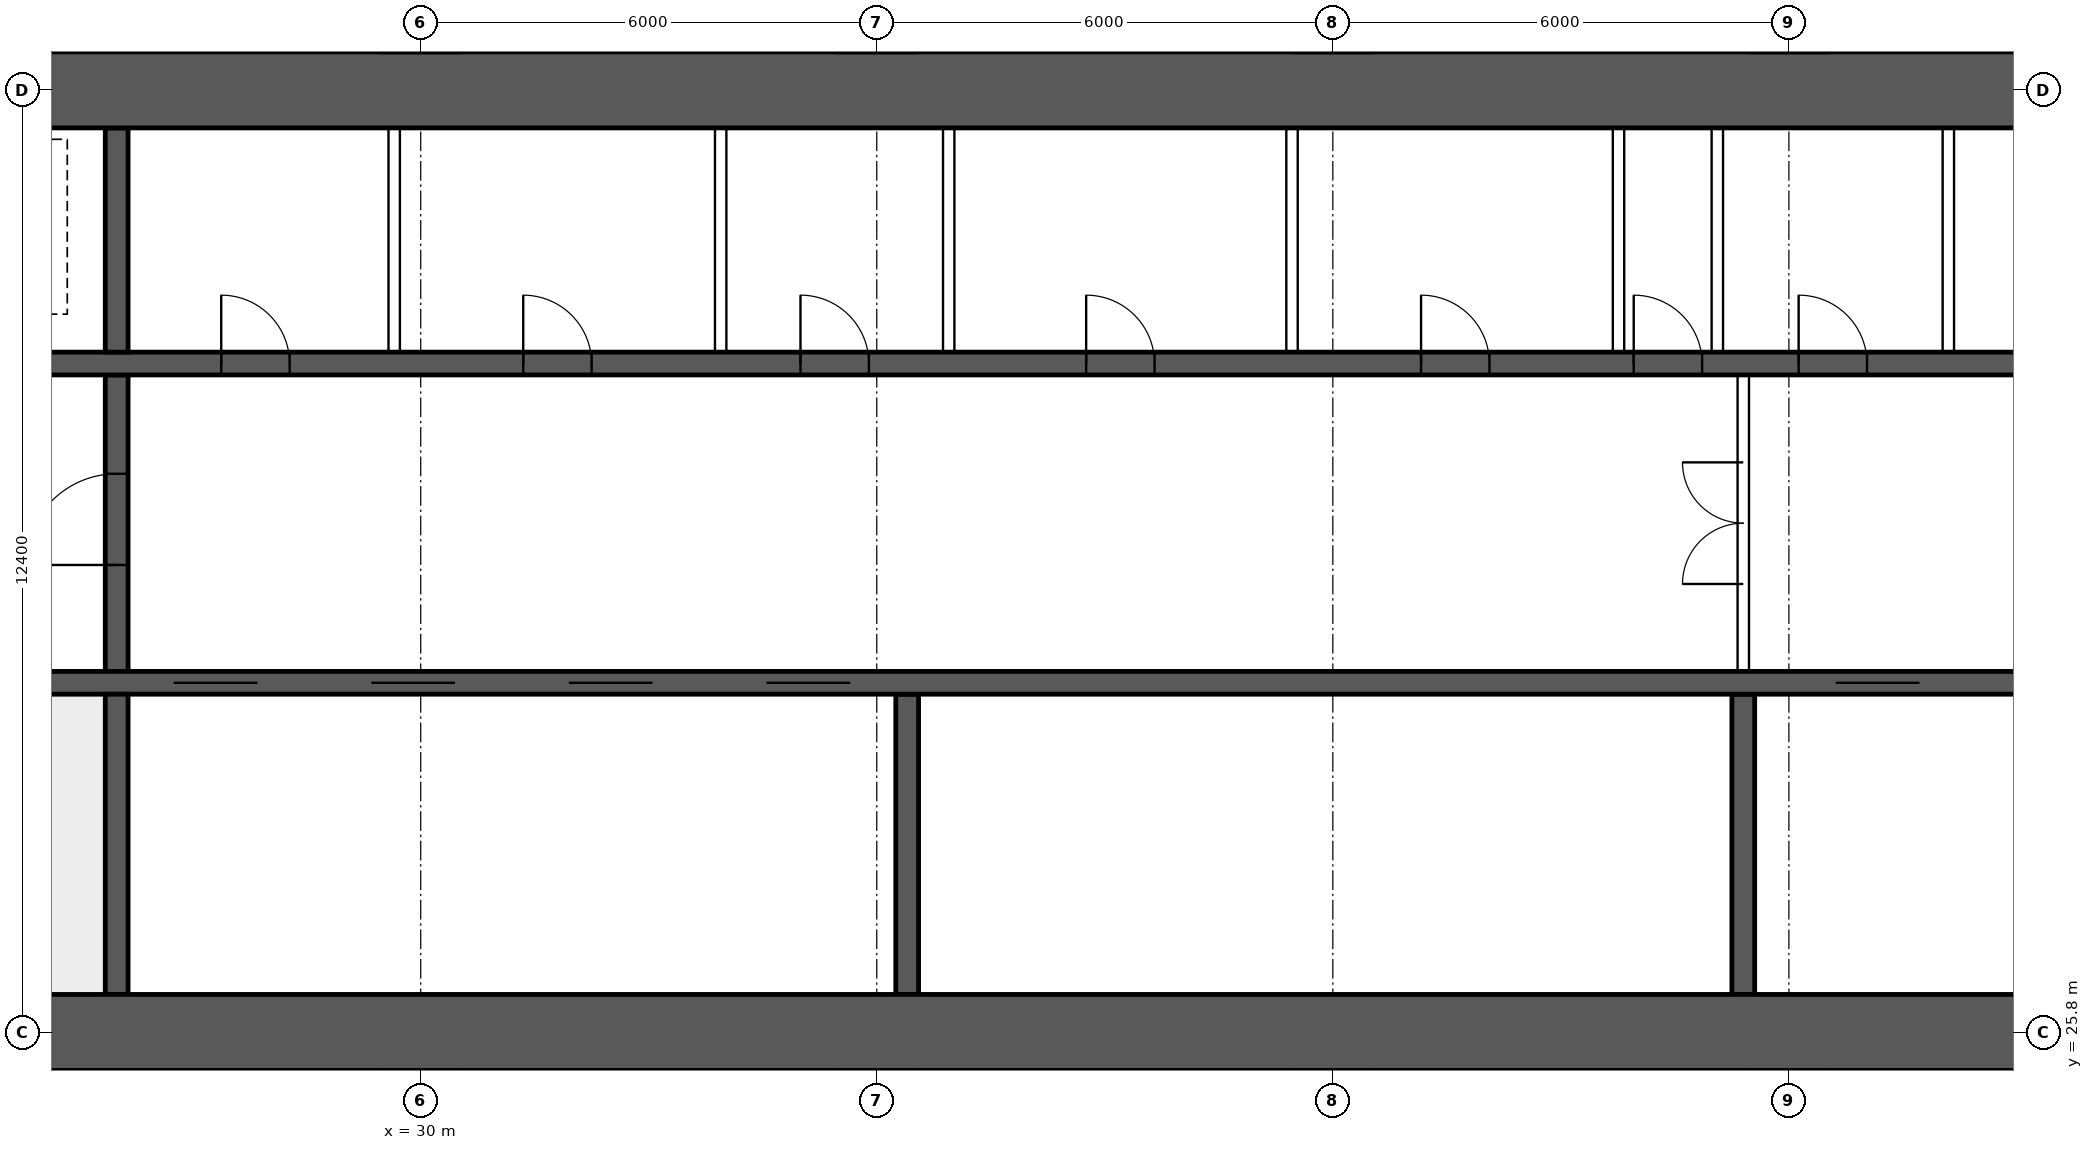
"""IFC4 building model, lengths in metres.
Left out: names, types, materials, properties, quantities, classifications, styles, units other than length and angle.
Written with IfcOpenShell. Run it as: python <this file> out.ifc"""

import sys

from ifc_helpers import new_model, si_unit, direction, frame, frame_2d, origin, place, context, subcontext, project, spatial, rectangle, extrude, element, fill, save


model = new_model("IFC4")
c1 = context("Model", 3, precision=1e-05, world=origin(), true_north=direction((0.0, 1.0)))
c2 = subcontext(c1, "Body", "Model", "MODEL_VIEW")
j1 = project(units=[si_unit("LENGTHUNIT", "METRE"), si_unit("PLANEANGLEUNIT", "RADIAN")], contexts=[c1])
p1 = place(None, origin())
s1 = spatial("IfcSite", under=j1, at=p1, CompositionType="ELEMENT")
p2 = place(p1, origin())
s2 = spatial("IfcBuilding", under=s1, at=p2, CompositionType="ELEMENT")
p3 = place(p2, frame((0.0, 0.0, 53.95)))
s3 = spatial("IfcBuildingStorey", under=s2, at=p3, CompositionType="ELEMENT", Elevation=53.95)
for number, where, z_axis, x_axis in (
    (1, (18.0, 25.8, 0.0), (0.0, 0.0, 1.0), (1.0, 0.0, 0.0)),
    (2, (18.0, 38.2, 0.0), (0.0, 0.0, 1.0), (1.0, 0.0, 0.0)),
):
    element("IfcWall", number, at=place(p3, frame(where, z_axis=z_axis, x_axis=x_axis)), inside=s3, PredefinedType="SHEAR", context=c2, shape_type="SweptSolid", body=[
        extrude(rectangle(XDim=48.0, YDim=1.0, at=frame_2d((24.0, 0.0))), origin(), (0.0, 0.0, 1.0), 3.75),
    ])
p4 = place(p3, frame((18.5, 30.4, 0.0), z_axis=(0.0, 0.0, 1.0), x_axis=(1.0, 0.0, 0.0)))
e3 = element("IfcWall", 3, at=p4, inside=s3, PredefinedType="SHEAR", context=c2, shape_type="SweptSolid", body=[
    extrude(rectangle(XDim=47.0, YDim=0.3, at=frame_2d((23.5, 0.0))), origin(), (0.0, 0.0, 1.0), 3.75),
])
p5 = place(p4, frame((0.4, 0.0, 0.0)))
e4 = element("IfcOpeningElement", 4, at=p5, cuts=e3, PredefinedType="OPENING", context=c2, shape_type="SweptSolid", body=[
    extrude(rectangle(XDim=1.0, YDim=2.1, at=frame_2d((0.5, 1.05))), frame((0.0, 0.16, 0.0), z_axis=(0.0, -1.0, 0.0), x_axis=(1.0, 0.0, 0.0)), (0.0, 0.0, 1.0), 0.32),
])
p6 = place(p4, frame((45.6, 0.0, 0.0)))
e5 = element("IfcOpeningElement", 5, at=p6, cuts=e3, PredefinedType="OPENING", context=c2, shape_type="SweptSolid", body=[
    extrude(rectangle(XDim=1.0, YDim=2.1, at=frame_2d((0.5, 1.05))), frame((0.0, 0.16, 0.0), z_axis=(0.0, -1.0, 0.0), x_axis=(1.0, 0.0, 0.0)), (0.0, 0.0, 1.0), 0.32),
])
p7 = place(p4, frame((8.25, 0.0, 0.0)))
e6 = element("IfcOpeningElement", 6, at=p7, cuts=e3, PredefinedType="OPENING", context=c2, shape_type="SweptSolid", body=[
    extrude(rectangle(XDim=1.1, YDim=2.1, at=frame_2d((0.55, 1.05))), frame((0.0, 0.16, 0.0), z_axis=(0.0, -1.0, 0.0), x_axis=(1.0, 0.0, 0.0)), (0.0, 0.0, 1.0), 0.32),
])
p8 = place(p4, frame((10.85, 0.0, 0.0)))
e7 = element("IfcOpeningElement", 7, at=p8, cuts=e3, PredefinedType="OPENING", context=c2, shape_type="SweptSolid", body=[
    extrude(rectangle(XDim=1.1, YDim=2.1, at=frame_2d((0.55, 1.05))), frame((0.0, 0.16, 0.0), z_axis=(0.0, -1.0, 0.0), x_axis=(1.0, 0.0, 0.0)), (0.0, 0.0, 1.0), 0.32),
])
p9 = place(p4, frame((13.45, 0.0, 0.0)))
e8 = element("IfcOpeningElement", 8, at=p9, cuts=e3, PredefinedType="OPENING", context=c2, shape_type="SweptSolid", body=[
    extrude(rectangle(XDim=1.1, YDim=2.1, at=frame_2d((0.55, 1.05))), frame((0.0, 0.16, 0.0), z_axis=(0.0, -1.0, 0.0), x_axis=(1.0, 0.0, 0.0)), (0.0, 0.0, 1.0), 0.32),
])
p10 = place(p4, frame((16.05, 0.0, 0.0)))
e9 = element("IfcOpeningElement", 9, at=p10, cuts=e3, PredefinedType="OPENING", context=c2, shape_type="SweptSolid", body=[
    extrude(rectangle(XDim=1.1, YDim=2.1, at=frame_2d((0.55, 1.05))), frame((0.0, 0.16, 0.0), z_axis=(0.0, -1.0, 0.0), x_axis=(1.0, 0.0, 0.0)), (0.0, 0.0, 1.0), 0.32),
])
p11 = place(p4, frame((30.117, 0.0, 0.0)))
e10 = element("IfcOpeningElement", 10, at=p11, cuts=e3, PredefinedType="OPENING", context=c2, shape_type="SweptSolid", body=[
    extrude(rectangle(XDim=1.1, YDim=2.1, at=frame_2d((0.55, 1.05))), frame((0.0, 0.16, 0.0), z_axis=(0.0, -1.0, 0.0), x_axis=(1.0, 0.0, 0.0)), (0.0, 0.0, 1.0), 0.32),
])
p12 = place(p4, frame((33.65, 0.0, 0.0)))
e11 = element("IfcOpeningElement", 11, at=p12, cuts=e3, PredefinedType="OPENING", context=c2, shape_type="SweptSolid", body=[
    extrude(rectangle(XDim=1.1, YDim=2.1, at=frame_2d((0.55, 1.05))), frame((0.0, 0.16, 0.0), z_axis=(0.0, -1.0, 0.0), x_axis=(1.0, 0.0, 0.0)), (0.0, 0.0, 1.0), 0.32),
])
p13 = place(p4, frame((37.183, 0.0, 0.0)))
e12 = element("IfcOpeningElement", 12, at=p13, cuts=e3, PredefinedType="OPENING", context=c2, shape_type="SweptSolid", body=[
    extrude(rectangle(XDim=1.1, YDim=2.1, at=frame_2d((0.55, 1.05))), frame((0.0, 0.16, 0.0), z_axis=(0.0, -1.0, 0.0), x_axis=(1.0, 0.0, 0.0)), (0.0, 0.0, 1.0), 0.32),
])
p14 = place(p3, frame((18.5, 34.6, 0.0), z_axis=(0.0, 0.0, 1.0), x_axis=(1.0, 0.0, 0.0)))
e13 = element("IfcWall", 13, at=p14, inside=s3, PredefinedType="SHEAR", context=c2, shape_type="SweptSolid", body=[
    extrude(rectangle(XDim=47.0, YDim=0.3, at=frame_2d((23.5, 0.0))), origin(), (0.0, 0.0, 1.0), 3.75),
])
p15 = place(p14, frame((0.9, 0.0, 0.0)))
e14 = element("IfcOpeningElement", 14, at=p15, cuts=e13, PredefinedType="OPENING", context=c2, shape_type="SweptSolid", body=[
    extrude(rectangle(XDim=1.1, YDim=2.1, at=frame_2d((0.55, 1.05))), frame((0.0, 0.16, 0.0), z_axis=(0.0, -1.0, 0.0), x_axis=(1.0, 0.0, 0.0)), (0.0, 0.0, 1.0), 0.32),
])
p16 = place(p14, frame((45.0, 0.0, 0.0)))
e15 = element("IfcOpeningElement", 15, at=p16, cuts=e13, PredefinedType="OPENING", context=c2, shape_type="SweptSolid", body=[
    extrude(rectangle(XDim=1.1, YDim=2.1, at=frame_2d((0.55, 1.05))), frame((0.0, 0.16, 0.0), z_axis=(0.0, -1.0, 0.0), x_axis=(1.0, 0.0, 0.0)), (0.0, 0.0, 1.0), 0.32),
])
p17 = place(p14, frame((4.1, 0.0, 0.0)))
e16 = element("IfcOpeningElement", 16, at=p17, cuts=e13, PredefinedType="OPENING", context=c2, shape_type="SweptSolid", body=[
    extrude(rectangle(XDim=0.9, YDim=2.1, at=frame_2d((0.45, 1.05))), frame((0.0, 0.16, 0.0), z_axis=(0.0, -1.0, 0.0), x_axis=(1.0, 0.0, 0.0)), (0.0, 0.0, 1.0), 0.32),
])
p18 = place(p14, frame((42.0, 0.0, 0.0)))
e17 = element("IfcOpeningElement", 17, at=p18, cuts=e13, PredefinedType="OPENING", context=c2, shape_type="SweptSolid", body=[
    extrude(rectangle(XDim=0.9, YDim=2.1, at=frame_2d((0.45, 1.05))), frame((0.0, 0.16, 0.0), z_axis=(0.0, -1.0, 0.0), x_axis=(1.0, 0.0, 0.0)), (0.0, 0.0, 1.0), 0.32),
])
p19 = place(p14, frame((8.875, 0.0, 0.0)))
e18 = element("IfcOpeningElement", 18, at=p19, cuts=e13, PredefinedType="OPENING", context=c2, shape_type="SweptSolid", body=[
    extrude(rectangle(XDim=0.9, YDim=2.1, at=frame_2d((0.45, 1.05))), frame((0.0, 0.16, 0.0), z_axis=(0.0, -1.0, 0.0), x_axis=(1.0, 0.0, 0.0)), (0.0, 0.0, 1.0), 0.32),
])
p20 = place(p14, frame((12.849, 0.0, 0.0)))
e19 = element("IfcOpeningElement", 19, at=p20, cuts=e13, PredefinedType="OPENING", context=c2, shape_type="SweptSolid", body=[
    extrude(rectangle(XDim=0.9, YDim=2.1, at=frame_2d((0.45, 1.05))), frame((0.0, 0.16, 0.0), z_axis=(0.0, -1.0, 0.0), x_axis=(1.0, 0.0, 0.0)), (0.0, 0.0, 1.0), 0.32),
])
p21 = place(p14, frame((16.496, 0.0, 0.0)))
e20 = element("IfcOpeningElement", 20, at=p21, cuts=e13, PredefinedType="OPENING", context=c2, shape_type="SweptSolid", body=[
    extrude(rectangle(XDim=0.9, YDim=2.1, at=frame_2d((0.45, 1.05))), frame((0.0, 0.16, 0.0), z_axis=(0.0, -1.0, 0.0), x_axis=(1.0, 0.0, 0.0)), (0.0, 0.0, 1.0), 0.32),
])
p22 = place(p14, frame((20.255, 0.0, 0.0)))
e21 = element("IfcOpeningElement", 21, at=p22, cuts=e13, PredefinedType="OPENING", context=c2, shape_type="SweptSolid", body=[
    extrude(rectangle(XDim=0.9, YDim=2.1, at=frame_2d((0.45, 1.05))), frame((0.0, 0.16, 0.0), z_axis=(0.0, -1.0, 0.0), x_axis=(1.0, 0.0, 0.0)), (0.0, 0.0, 1.0), 0.32),
])
p23 = place(p14, frame((24.661, 0.0, 0.0)))
e22 = element("IfcOpeningElement", 22, at=p23, cuts=e13, PredefinedType="OPENING", context=c2, shape_type="SweptSolid", body=[
    extrude(rectangle(XDim=0.9, YDim=2.1, at=frame_2d((0.45, 1.05))), frame((0.0, 0.16, 0.0), z_axis=(0.0, -1.0, 0.0), x_axis=(1.0, 0.0, 0.0)), (0.0, 0.0, 1.0), 0.32),
])
p24 = place(p14, frame((27.458, 0.0, 0.0)))
e23 = element("IfcOpeningElement", 23, at=p24, cuts=e13, PredefinedType="OPENING", context=c2, shape_type="SweptSolid", body=[
    extrude(rectangle(XDim=0.9, YDim=2.1, at=frame_2d((0.45, 1.05))), frame((0.0, 0.16, 0.0), z_axis=(0.0, -1.0, 0.0), x_axis=(1.0, 0.0, 0.0)), (0.0, 0.0, 1.0), 0.32),
])
p25 = place(p14, frame((29.628, 0.0, 0.0)))
e24 = element("IfcOpeningElement", 24, at=p25, cuts=e13, PredefinedType="OPENING", context=c2, shape_type="SweptSolid", body=[
    extrude(rectangle(XDim=0.9, YDim=2.1, at=frame_2d((0.45, 1.05))), frame((0.0, 0.16, 0.0), z_axis=(0.0, -1.0, 0.0), x_axis=(1.0, 0.0, 0.0)), (0.0, 0.0, 1.0), 0.32),
])
p26 = place(p14, frame((33.427, 0.0, 0.0)))
e25 = element("IfcOpeningElement", 25, at=p26, cuts=e13, PredefinedType="OPENING", context=c2, shape_type="SweptSolid", body=[
    extrude(rectangle(XDim=0.9, YDim=2.1, at=frame_2d((0.45, 1.05))), frame((0.0, 0.16, 0.0), z_axis=(0.0, -1.0, 0.0), x_axis=(1.0, 0.0, 0.0)), (0.0, 0.0, 1.0), 0.32),
])
p27 = place(p14, frame((37.378, 0.0, 0.0)))
e26 = element("IfcOpeningElement", 26, at=p27, cuts=e13, PredefinedType="OPENING", context=c2, shape_type="SweptSolid", body=[
    extrude(rectangle(XDim=0.9, YDim=2.1, at=frame_2d((0.45, 1.05))), frame((0.0, 0.16, 0.0), z_axis=(0.0, -1.0, 0.0), x_axis=(1.0, 0.0, 0.0)), (0.0, 0.0, 1.0), 0.32),
])
p28 = place(p3, frame((26.0, 26.3, 0.0), z_axis=(0.0, 0.0, 1.0), x_axis=(0.0, 1.0, 0.0)))
e27 = element("IfcWall", 27, at=p28, inside=s3, PredefinedType="SHEAR", context=c2, shape_type="SweptSolid", body=[
    extrude(rectangle(XDim=3.95, YDim=0.3, at=frame_2d((1.975, 0.0))), origin(), (0.0, 0.0, 1.0), 3.75),
])
p29 = place(p3, frame((26.0, 30.55, 0.0), z_axis=(0.0, 0.0, 1.0), x_axis=(0.0, 1.0, 0.0)))
e28 = element("IfcWall", 28, at=p29, inside=s3, PredefinedType="SHEAR", context=c2, shape_type="SweptSolid", body=[
    extrude(rectangle(XDim=3.9, YDim=0.3, at=frame_2d((1.95, 0.0))), origin(), (0.0, 0.0, 1.0), 3.75),
])
p30 = place(p29, frame((1.4, 0.0, 0.0)))
e29 = element("IfcOpeningElement", 29, at=p30, cuts=e28, PredefinedType="OPENING", context=c2, shape_type="SweptSolid", body=[
    extrude(rectangle(XDim=1.2, YDim=2.1, at=frame_2d((0.6, 1.05))), frame((0.0, 0.16, 0.0), z_axis=(0.0, -1.0, 0.0), x_axis=(1.0, 0.0, 0.0)), (0.0, 0.0, 1.0), 0.32),
])
p31 = place(p3, frame((26.0, 34.75, 0.0), z_axis=(0.0, 0.0, 1.0), x_axis=(0.0, 1.0, 0.0)))
e30 = element("IfcWall", 30, at=p31, inside=s3, PredefinedType="SHEAR", context=c2, shape_type="SweptSolid", body=[
    extrude(rectangle(XDim=2.95, YDim=0.3, at=frame_2d((1.475, 0.0))), origin(), (0.0, 0.0, 1.0), 3.75),
])
for number, where, z_axis, x_axis in (
    (31, (36.4, 26.3, 0.0), (0.0, 0.0, 1.0), (0.0, 1.0, 0.0)),
    (32, (47.4, 26.3, 0.0), (0.0, 0.0, 1.0), (0.0, 1.0, 0.0)),
):
    element("IfcWall", number, at=place(p3, frame(where, z_axis=z_axis, x_axis=x_axis)), inside=s3, PredefinedType="SHEAR", context=c2, shape_type="SweptSolid", body=[
        extrude(rectangle(XDim=3.95, YDim=0.3, at=frame_2d((1.975, 0.0))), origin(), (0.0, 0.0, 1.0), 3.75),
    ])
p32 = place(p3, frame((47.4, 30.55, 0.0), z_axis=(0.0, 0.0, 1.0), x_axis=(0.0, 1.0, 0.0)))
e33 = element("IfcWall", 33, at=p32, inside=s3, PredefinedType="SOLIDWALL", context=c2, shape_type="SweptSolid", body=[
    extrude(rectangle(XDim=3.9, YDim=0.15, at=frame_2d((1.95, 0.0))), origin(), (0.0, 0.0, 1.0), 3.5),
])
p33 = place(p32, frame((1.15, 0.0, 0.0)))
e34 = element("IfcOpeningElement", 34, at=p33, cuts=e33, PredefinedType="OPENING", context=c2, shape_type="SweptSolid", body=[
    extrude(rectangle(XDim=1.6, YDim=2.1, at=frame_2d((0.8, 1.05))), frame((0.0, 0.085, 0.0), z_axis=(0.0, -1.0, 0.0), x_axis=(1.0, 0.0, 0.0)), (0.0, 0.0, 1.0), 0.17),
])
for number, where, z_axis, x_axis in (
    (35, (29.651, 34.75, 0.0), (0.0, 0.0, 1.0), (0.0, 1.0, 0.0)),
    (36, (33.946, 34.75, 0.0), (0.0, 0.0, 1.0), (0.0, 1.0, 0.0)),
    (37, (36.946, 34.75, 0.0), (0.0, 0.0, 1.0), (0.0, 1.0, 0.0)),
    (38, (41.463, 34.75, 0.0), (0.0, 0.0, 1.0), (0.0, 1.0, 0.0)),
    (39, (45.758, 34.75, 0.0), (0.0, 0.0, 1.0), (0.0, 1.0, 0.0)),
    (40, (47.058, 34.75, 0.0), (0.0, 0.0, 1.0), (0.0, 1.0, 0.0)),
    (41, (50.098, 34.75, 0.0), (0.0, 0.0, 1.0), (0.0, 1.0, 0.0)),
):
    element("IfcWall", number, at=place(p3, frame(where, z_axis=z_axis, x_axis=x_axis)), inside=s3, PredefinedType="SOLIDWALL", context=c2, shape_type="SweptSolid", body=[
        extrude(rectangle(XDim=2.95, YDim=0.15, at=frame_2d((1.475, 0.0))), origin(), (0.0, 0.0, 1.0), 3.5),
    ])
for number, where, z_axis, x_axis in (
    (42, (33.625, 14.9, 0.0), (0.0, 0.0, 1.0), (0.0, 1.0, 0.0)),
    (43, (39.075, 14.9, 0.0), (0.0, 0.0, 1.0), (0.0, 1.0, 0.0)),
    (44, (45.21, 14.9, 0.0), (0.0, 0.0, 1.0), (0.0, 1.0, 0.0)),
):
    element("IfcWall", number, at=place(p3, frame(where, z_axis=z_axis, x_axis=x_axis)), inside=s3, PredefinedType="PARTITIONING", context=c2, shape_type="SweptSolid", body=[
        extrude(rectangle(XDim=10.4, YDim=0.15, at=frame_2d((5.2, 0.0))), origin(), (0.0, 0.0, 1.0), 3.5),
    ])
p34 = place(p33, origin())
e45 = element("IfcDoor", 45, at=p34, inside=s3, OperationType="DOUBLE_DOOR_SINGLE_SWING", PredefinedType="DOOR", context=c2, shape_type="SweptSolid", body=[
    extrude(rectangle(XDim=1.6, YDim=2.1, at=frame_2d((0.8, 1.05))), frame((0.0, 0.025, 0.0), z_axis=(0.0, -1.0, 0.0), x_axis=(1.0, 0.0, 0.0)), (0.0, 0.0, 1.0), 0.05),
])
fill(e34, e45)
p35 = place(p30, origin())
e46 = element("IfcDoor", 46, at=p35, inside=s3, OperationType="SINGLE_SWING_LEFT", PredefinedType="DOOR", context=c2, shape_type="SweptSolid", body=[
    extrude(rectangle(XDim=1.2, YDim=2.1, at=frame_2d((0.6, 1.05))), frame((0.0, 0.025, 0.0), z_axis=(0.0, -1.0, 0.0), x_axis=(1.0, 0.0, 0.0)), (0.0, 0.0, 1.0), 0.05),
])
fill(e29, e46)
p36 = place(p19, origin())
e47 = element("IfcDoor", 47, at=p36, inside=s3, OperationType="SINGLE_SWING_LEFT", PredefinedType="DOOR", context=c2, shape_type="SweptSolid", body=[
    extrude(rectangle(XDim=0.9, YDim=2.1, at=frame_2d((0.45, 1.05))), frame((0.0, 0.025, 0.0), z_axis=(0.0, -1.0, 0.0), x_axis=(1.0, 0.0, 0.0)), (0.0, 0.0, 1.0), 0.05),
])
fill(e18, e47)
p37 = place(p20, origin())
e48 = element("IfcDoor", 48, at=p37, inside=s3, OperationType="SINGLE_SWING_LEFT", PredefinedType="DOOR", context=c2, shape_type="SweptSolid", body=[
    extrude(rectangle(XDim=0.9, YDim=2.1, at=frame_2d((0.45, 1.05))), frame((0.0, 0.025, 0.0), z_axis=(0.0, -1.0, 0.0), x_axis=(1.0, 0.0, 0.0)), (0.0, 0.0, 1.0), 0.05),
])
fill(e19, e48)
p38 = place(p21, origin())
e49 = element("IfcDoor", 49, at=p38, inside=s3, OperationType="SINGLE_SWING_LEFT", PredefinedType="DOOR", context=c2, shape_type="SweptSolid", body=[
    extrude(rectangle(XDim=0.9, YDim=2.1, at=frame_2d((0.45, 1.05))), frame((0.0, 0.025, 0.0), z_axis=(0.0, -1.0, 0.0), x_axis=(1.0, 0.0, 0.0)), (0.0, 0.0, 1.0), 0.05),
])
fill(e20, e49)
p39 = place(p22, origin())
e50 = element("IfcDoor", 50, at=p39, inside=s3, OperationType="SINGLE_SWING_LEFT", PredefinedType="DOOR", context=c2, shape_type="SweptSolid", body=[
    extrude(rectangle(XDim=0.9, YDim=2.1, at=frame_2d((0.45, 1.05))), frame((0.0, 0.025, 0.0), z_axis=(0.0, -1.0, 0.0), x_axis=(1.0, 0.0, 0.0)), (0.0, 0.0, 1.0), 0.05),
])
fill(e21, e50)
p40 = place(p23, origin())
e51 = element("IfcDoor", 51, at=p40, inside=s3, OperationType="SINGLE_SWING_LEFT", PredefinedType="DOOR", context=c2, shape_type="SweptSolid", body=[
    extrude(rectangle(XDim=0.9, YDim=2.1, at=frame_2d((0.45, 1.05))), frame((0.0, 0.025, 0.0), z_axis=(0.0, -1.0, 0.0), x_axis=(1.0, 0.0, 0.0)), (0.0, 0.0, 1.0), 0.05),
])
fill(e22, e51)
p41 = place(p24, origin())
e52 = element("IfcDoor", 52, at=p41, inside=s3, OperationType="SINGLE_SWING_LEFT", PredefinedType="DOOR", context=c2, shape_type="SweptSolid", body=[
    extrude(rectangle(XDim=0.9, YDim=2.1, at=frame_2d((0.45, 1.05))), frame((0.0, 0.025, 0.0), z_axis=(0.0, -1.0, 0.0), x_axis=(1.0, 0.0, 0.0)), (0.0, 0.0, 1.0), 0.05),
])
fill(e23, e52)
p42 = place(p25, origin())
e53 = element("IfcDoor", 53, at=p42, inside=s3, OperationType="SINGLE_SWING_LEFT", PredefinedType="DOOR", context=c2, shape_type="SweptSolid", body=[
    extrude(rectangle(XDim=0.9, YDim=2.1, at=frame_2d((0.45, 1.05))), frame((0.0, 0.025, 0.0), z_axis=(0.0, -1.0, 0.0), x_axis=(1.0, 0.0, 0.0)), (0.0, 0.0, 1.0), 0.05),
])
fill(e24, e53)
p43 = place(p7, origin())
e54 = element("IfcDoor", 54, at=p43, inside=s3, OperationType="DOUBLE_DOOR_SLIDING", PredefinedType="DOOR", context=c2, shape_type="SweptSolid", body=[
    extrude(rectangle(XDim=1.1, YDim=2.1, at=frame_2d((0.55, 1.05))), frame((0.0, 0.025, 0.0), z_axis=(0.0, -1.0, 0.0), x_axis=(1.0, 0.0, 0.0)), (0.0, 0.0, 1.0), 0.05),
])
fill(e6, e54)
p44 = place(p8, origin())
e55 = element("IfcDoor", 55, at=p44, inside=s3, OperationType="DOUBLE_DOOR_SLIDING", PredefinedType="DOOR", context=c2, shape_type="SweptSolid", body=[
    extrude(rectangle(XDim=1.1, YDim=2.1, at=frame_2d((0.55, 1.05))), frame((0.0, 0.025, 0.0), z_axis=(0.0, -1.0, 0.0), x_axis=(1.0, 0.0, 0.0)), (0.0, 0.0, 1.0), 0.05),
])
fill(e7, e55)
p45 = place(p9, origin())
e56 = element("IfcDoor", 56, at=p45, inside=s3, OperationType="DOUBLE_DOOR_SLIDING", PredefinedType="DOOR", context=c2, shape_type="SweptSolid", body=[
    extrude(rectangle(XDim=1.1, YDim=2.1, at=frame_2d((0.55, 1.05))), frame((0.0, 0.025, 0.0), z_axis=(0.0, -1.0, 0.0), x_axis=(1.0, 0.0, 0.0)), (0.0, 0.0, 1.0), 0.05),
])
fill(e8, e56)
p46 = place(p10, origin())
e57 = element("IfcDoor", 57, at=p46, inside=s3, OperationType="DOUBLE_DOOR_SLIDING", PredefinedType="DOOR", context=c2, shape_type="SweptSolid", body=[
    extrude(rectangle(XDim=1.1, YDim=2.1, at=frame_2d((0.55, 1.05))), frame((0.0, 0.025, 0.0), z_axis=(0.0, -1.0, 0.0), x_axis=(1.0, 0.0, 0.0)), (0.0, 0.0, 1.0), 0.05),
])
fill(e9, e57)
p47 = place(p11, origin())
e58 = element("IfcDoor", 58, at=p47, inside=s3, OperationType="DOUBLE_DOOR_SLIDING", PredefinedType="DOOR", context=c2, shape_type="SweptSolid", body=[
    extrude(rectangle(XDim=1.1, YDim=2.1, at=frame_2d((0.55, 1.05))), frame((0.0, 0.025, 0.0), z_axis=(0.0, -1.0, 0.0), x_axis=(1.0, 0.0, 0.0)), (0.0, 0.0, 1.0), 0.05),
])
fill(e10, e58)
save(model, sys.argv[1])
